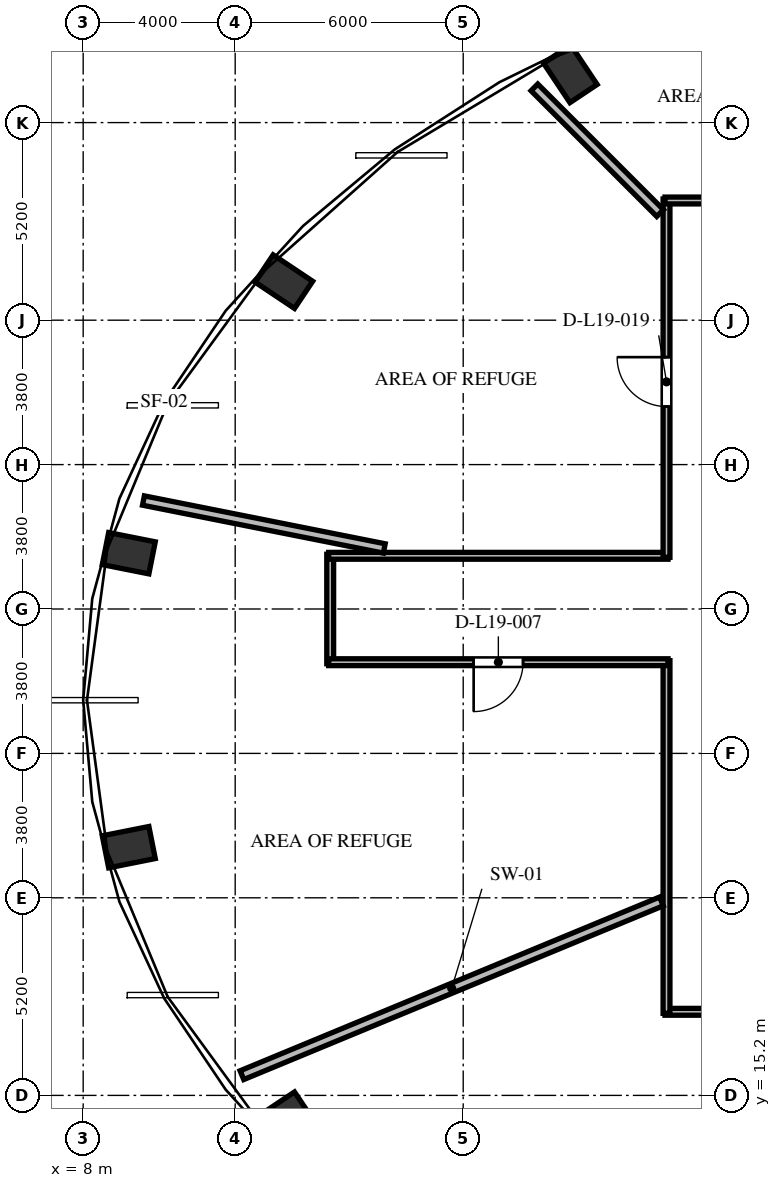
"""IFC4 building model, lengths in metres.
Left out: names, types, materials, properties, quantities, classifications, styles, units other than length and angle.
Written with IfcOpenShell. Run it as: python <this file> out.ifc"""

import sys

from ifc_helpers import new_model, si_unit, direction, frame, frame_2d, origin, origin_2d, place, context, subcontext, project, spatial, rectangle, extrude, element, fill, save


model = new_model("IFC4")
c1 = context("Model", 3, precision=1e-05, world=origin(), true_north=direction((0.0, 1.0)))
c2 = subcontext(c1, "Body", "Model", "MODEL_VIEW")
j1 = project(units=[si_unit("LENGTHUNIT", "METRE"), si_unit("PLANEANGLEUNIT", "RADIAN")], contexts=[c1])
p1 = place(None, origin())
s1 = spatial("IfcSite", under=j1, at=p1, CompositionType="ELEMENT")
p2 = place(p1, origin())
s2 = spatial("IfcBuilding", under=s1, at=p2, CompositionType="ELEMENT")
p3 = place(p2, frame((0.0, 0.0, 76.272)))
s3 = spatial("IfcBuildingStorey", under=s2, at=p3, CompositionType="ELEMENT", Elevation=76.272)
for number, where, z_axis, x_axis in (
    (1, (20.819, 42.084, 0.0), (0.0, 0.0, 1.0), (-0.556, 0.831, 0.0)),
    (2, (13.28, 36.614, 0.0), (0.0, 0.0, 1.0), (-0.831, 0.556, 0.0)),
    (3, (9.2, 29.468, 0.0), (0.0, 0.0, 1.0), (-0.981, 0.195, 0.0)),
    (4, (9.2, 21.732, 0.0), (0.0, 0.0, 1.0), (-0.981, -0.195, 0.0)),
    (5, (13.28, 14.586, 0.0), (0.0, 0.0, 1.0), (-0.831, -0.556, 0.0)),
):
    element("IfcColumn", number, at=place(p3, frame(where, z_axis=z_axis, x_axis=x_axis)), inside=s3, PredefinedType="COLUMN", context=c2, shape_type="SweptSolid", body=[
        extrude(rectangle(XDim=1.25, YDim=0.86, at=origin_2d()), origin(), (0.0, 0.0, 1.0), 5.472),
    ])
p4 = place(p3, frame((14.5, 26.56, 0.0), z_axis=(0.0, 0.0, 1.0), x_axis=(0.0, 1.0, 0.0)))
e6 = element("IfcWall", 6, at=p4, inside=s3, PredefinedType="PARTITIONING", context=c2, shape_type="SweptSolid", body=[
    extrude(rectangle(XDim=2.88, YDim=0.18, at=frame_2d((1.44, 0.0))), origin(), (0.0, 0.0, 1.0), 5.022),
])
p5 = place(p3, frame((14.46, 29.4, 0.0), z_axis=(0.0, 0.0, 1.0), x_axis=(1.0, 0.0, 0.0)))
e7 = element("IfcWall", 7, at=p5, inside=s3, PredefinedType="PARTITIONING", context=c2, shape_type="SweptSolid", body=[
    extrude(rectangle(XDim=8.93, YDim=0.18, at=frame_2d((4.465, 0.0))), origin(), (0.0, 0.0, 1.0), 3.607),
])
p6 = place(p3, frame((23.35, 29.36, 0.0), z_axis=(0.0, 0.0, 1.0), x_axis=(0.0, 1.0, 0.0)))
e8 = element("IfcWall", 8, at=p6, inside=s3, PredefinedType="PARTITIONING", context=c2, shape_type="SweptSolid", body=[
    extrude(rectangle(XDim=9.43, YDim=0.18, at=frame_2d((4.715, 0.0))), origin(), (0.0, 0.0, 1.0), 5.022),
])
p7 = place(p6, frame((3.968, 0.0, 0.0)))
e9 = element("IfcOpeningElement", 9, at=p7, cuts=e8, PredefinedType="OPENING", context=c2, shape_type="SweptSolid", body=[
    extrude(rectangle(XDim=1.3, YDim=2.2, at=frame_2d((0.65, 1.1))), frame((0.0, 0.1, 0.0), z_axis=(0.0, -1.0, 0.0), x_axis=(1.0, 0.0, 0.0)), (0.0, 0.0, 1.0), 0.2),
])
p8 = place(p3, frame((23.31, 38.75, 0.0), z_axis=(0.0, 0.0, 1.0), x_axis=(1.0, 0.0, 0.0)))
e10 = element("IfcWall", 10, at=p8, inside=s3, PredefinedType="PARTITIONING", context=c2, shape_type="SweptSolid", body=[
    extrude(rectangle(XDim=29.88, YDim=0.18, at=frame_2d((14.94, 0.0))), origin(), (0.0, 0.0, 1.0), 4.647),
])
p9 = place(p8, frame((21.29, 0.0, 0.0)))
e11 = element("IfcOpeningElement", 11, at=p9, cuts=e10, PredefinedType="OPENING", context=c2, shape_type="SweptSolid", body=[
    extrude(rectangle(XDim=1.1, YDim=2.15, at=frame_2d((0.55, 1.075))), frame((0.0, 0.1, 0.0), z_axis=(0.0, -1.0, 0.0), x_axis=(1.0, 0.0, 0.0)), (0.0, 0.0, 1.0), 0.2),
])
p10 = place(p8, frame((15.852, 0.0, 0.0)))
e12 = element("IfcOpeningElement", 12, at=p10, cuts=e10, PredefinedType="OPENING", context=c2, shape_type="SweptSolid", body=[
    extrude(rectangle(XDim=1.1, YDim=2.15, at=frame_2d((0.55, 1.075))), frame((0.0, 0.1, 0.0), z_axis=(0.0, -1.0, 0.0), x_axis=(1.0, 0.0, 0.0)), (0.0, 0.0, 1.0), 0.2),
])
p11 = place(p8, frame((10.788, 0.0, 0.0)))
e13 = element("IfcOpeningElement", 13, at=p11, cuts=e10, PredefinedType="OPENING", context=c2, shape_type="SweptSolid", body=[
    extrude(rectangle(XDim=1.3, YDim=2.2, at=frame_2d((0.65, 1.1))), frame((0.0, 0.1, 0.0), z_axis=(0.0, -1.0, 0.0), x_axis=(1.0, 0.0, 0.0)), (0.0, 0.0, 1.0), 0.2),
])
p12 = place(p8, frame((3.674, 0.0, 0.0)))
e14 = element("IfcOpeningElement", 14, at=p12, cuts=e10, PredefinedType="OPENING", context=c2, shape_type="SweptSolid", body=[
    extrude(rectangle(XDim=1.3, YDim=2.2, at=frame_2d((0.65, 1.1))), frame((0.0, 0.1, 0.0), z_axis=(0.0, -1.0, 0.0), x_axis=(1.0, 0.0, 0.0)), (0.0, 0.0, 1.0), 0.2),
])
p13 = place(p3, frame((45.24, 17.4, 0.0), z_axis=(0.0, 0.0, 1.0), x_axis=(-1.0, 0.0, 0.0)))
e15 = element("IfcWall", 15, at=p13, inside=s3, PredefinedType="PARTITIONING", context=c2, shape_type="SweptSolid", body=[
    extrude(rectangle(XDim=21.93, YDim=0.18, at=frame_2d((10.965, 0.0))), origin(), (0.0, 0.0, 1.0), 4.647),
])
p14 = place(p13, frame((17.659, 0.0, 0.0)))
e16 = element("IfcOpeningElement", 16, at=p14, cuts=e15, PredefinedType="OPENING", context=c2, shape_type="SweptSolid", body=[
    extrude(rectangle(XDim=1.3, YDim=2.2, at=frame_2d((0.65, 1.1))), frame((0.0, 0.1, 0.0), z_axis=(0.0, -1.0, 0.0), x_axis=(1.0, 0.0, 0.0)), (0.0, 0.0, 1.0), 0.2),
])
p15 = place(p13, frame((13.035, 0.0, 0.0)))
e17 = element("IfcOpeningElement", 17, at=p15, cuts=e15, PredefinedType="OPENING", context=c2, shape_type="SweptSolid", body=[
    extrude(rectangle(XDim=1.1, YDim=2.15, at=frame_2d((0.55, 1.075))), frame((0.0, 0.1, 0.0), z_axis=(0.0, -1.0, 0.0), x_axis=(1.0, 0.0, 0.0)), (0.0, 0.0, 1.0), 0.2),
])
p16 = place(p13, frame((8.409, 0.0, 0.0)))
e18 = element("IfcOpeningElement", 18, at=p16, cuts=e15, PredefinedType="OPENING", context=c2, shape_type="SweptSolid", body=[
    extrude(rectangle(XDim=1.1, YDim=2.15, at=frame_2d((0.55, 1.075))), frame((0.0, 0.1, 0.0), z_axis=(0.0, -1.0, 0.0), x_axis=(1.0, 0.0, 0.0)), (0.0, 0.0, 1.0), 0.2),
])
p17 = place(p13, frame((2.831, 0.0, 0.0)))
e19 = element("IfcOpeningElement", 19, at=p17, cuts=e15, PredefinedType="OPENING", context=c2, shape_type="SweptSolid", body=[
    extrude(rectangle(XDim=1.3, YDim=2.2, at=frame_2d((0.65, 1.1))), frame((0.0, 0.1, 0.0), z_axis=(0.0, -1.0, 0.0), x_axis=(1.0, 0.0, 0.0)), (0.0, 0.0, 1.0), 0.2),
])
p18 = place(p3, frame((23.35, 17.36, 0.0), z_axis=(0.0, 0.0, 1.0), x_axis=(0.0, 1.0, 0.0)))
e20 = element("IfcWall", 20, at=p18, inside=s3, PredefinedType="PARTITIONING", context=c2, shape_type="SweptSolid", body=[
    extrude(rectangle(XDim=9.28, YDim=0.18, at=frame_2d((4.64, 0.0))), origin(), (0.0, 0.0, 1.0), 5.022),
])
p19 = place(p3, frame((23.39, 26.6, 0.0), z_axis=(0.0, 0.0, 1.0), x_axis=(-1.0, 0.0, 0.0)))
e21 = element("IfcWall", 21, at=p19, inside=s3, PredefinedType="PARTITIONING", context=c2, shape_type="SweptSolid", body=[
    extrude(rectangle(XDim=8.93, YDim=0.18, at=frame_2d((4.465, 0.0))), origin(), (0.0, 0.0, 1.0), 5.022),
])
p20 = place(p19, frame((3.815, 0.0, 0.0)))
e22 = element("IfcOpeningElement", 22, at=p20, cuts=e21, PredefinedType="OPENING", context=c2, shape_type="SweptSolid", body=[
    extrude(rectangle(XDim=1.3, YDim=2.2, at=frame_2d((0.65, 1.1))), frame((0.0, 0.1, 0.0), z_axis=(0.0, -1.0, 0.0), x_axis=(1.0, 0.0, 0.0)), (0.0, 0.0, 1.0), 0.2),
])
p21 = place(p3, frame((23.182, 38.418, 0.0), z_axis=(0.0, 0.0, 1.0), x_axis=(-0.707132872244, 0.707080689167, 0.0)))
e23 = element("IfcWall", 23, at=p21, inside=s3, PredefinedType="SOLIDWALL", context=c2, shape_type="SweptSolid", body=[
    extrude(rectangle(XDim=4.678, YDim=0.25, at=frame_2d((2.339, 0.0))), origin(), (0.0, 0.0, 1.0), 5.022),
])
p22 = place(p3, frame((15.923, 29.594, 0.0), z_axis=(0.0, 0.0, 1.0), x_axis=(-0.980786497314, 0.195084204093, 0.0)))
e24 = element("IfcWall", 24, at=p22, inside=s3, PredefinedType="SOLIDWALL", context=c2, shape_type="SweptSolid", body=[
    extrude(rectangle(XDim=6.461, YDim=0.25, at=frame_2d((3.23, 0.0))), origin(), (0.0, 0.0, 1.0), 5.022),
])
p23 = place(p3, frame((23.217, 20.305, 0.0), z_axis=(0.0, 0.0, 1.0), x_axis=(-0.923880113583, -0.382682029531, 0.0)))
e25 = element("IfcWall", 25, at=p23, inside=s3, PredefinedType="SOLIDWALL", context=c2, shape_type="SweptSolid", body=[
    extrude(rectangle(XDim=11.948, YDim=0.25, at=frame_2d((5.974, 0.0))), origin(), (0.0, 0.0, 1.0), 5.022),
])
p24 = place(p3, frame((29.467, 17.239, 0.0), z_axis=(0.0, 0.0, 1.0), x_axis=(-0.615655228447, -0.788015634164, 0.0)))
e26 = element("IfcWall", 26, at=p24, inside=s3, PredefinedType="SOLIDWALL", context=c2, shape_type="SweptSolid", body=[
    extrude(rectangle(XDim=11.435, YDim=0.25, at=frame_2d((5.718, 0.0))), origin(), (0.0, 0.0, 1.0), 5.022),
])
p25 = place(p20, origin())
e27 = element("IfcDoor", 27, at=p25, inside=s3, OperationType="SINGLE_SWING_RIGHT", PredefinedType="DOOR", context=c2, shape_type="SweptSolid", body=[
    extrude(rectangle(XDim=1.3, YDim=2.2, at=frame_2d((0.65, 1.1))), frame((0.0, 0.025, 0.0), z_axis=(0.0, -1.0, 0.0), x_axis=(1.0, 0.0, 0.0)), (0.0, 0.0, 1.0), 0.05),
])
fill(e22, e27)
p26 = place(p7, origin())
e28 = element("IfcDoor", 28, at=p26, inside=s3, OperationType="SINGLE_SWING_RIGHT", PredefinedType="DOOR", context=c2, shape_type="SweptSolid", body=[
    extrude(rectangle(XDim=1.3, YDim=2.2, at=frame_2d((0.65, 1.1))), frame((0.0, 0.025, 0.0), z_axis=(0.0, -1.0, 0.0), x_axis=(1.0, 0.0, 0.0)), (0.0, 0.0, 1.0), 0.05),
])
fill(e9, e28)
save(model, sys.argv[1])
